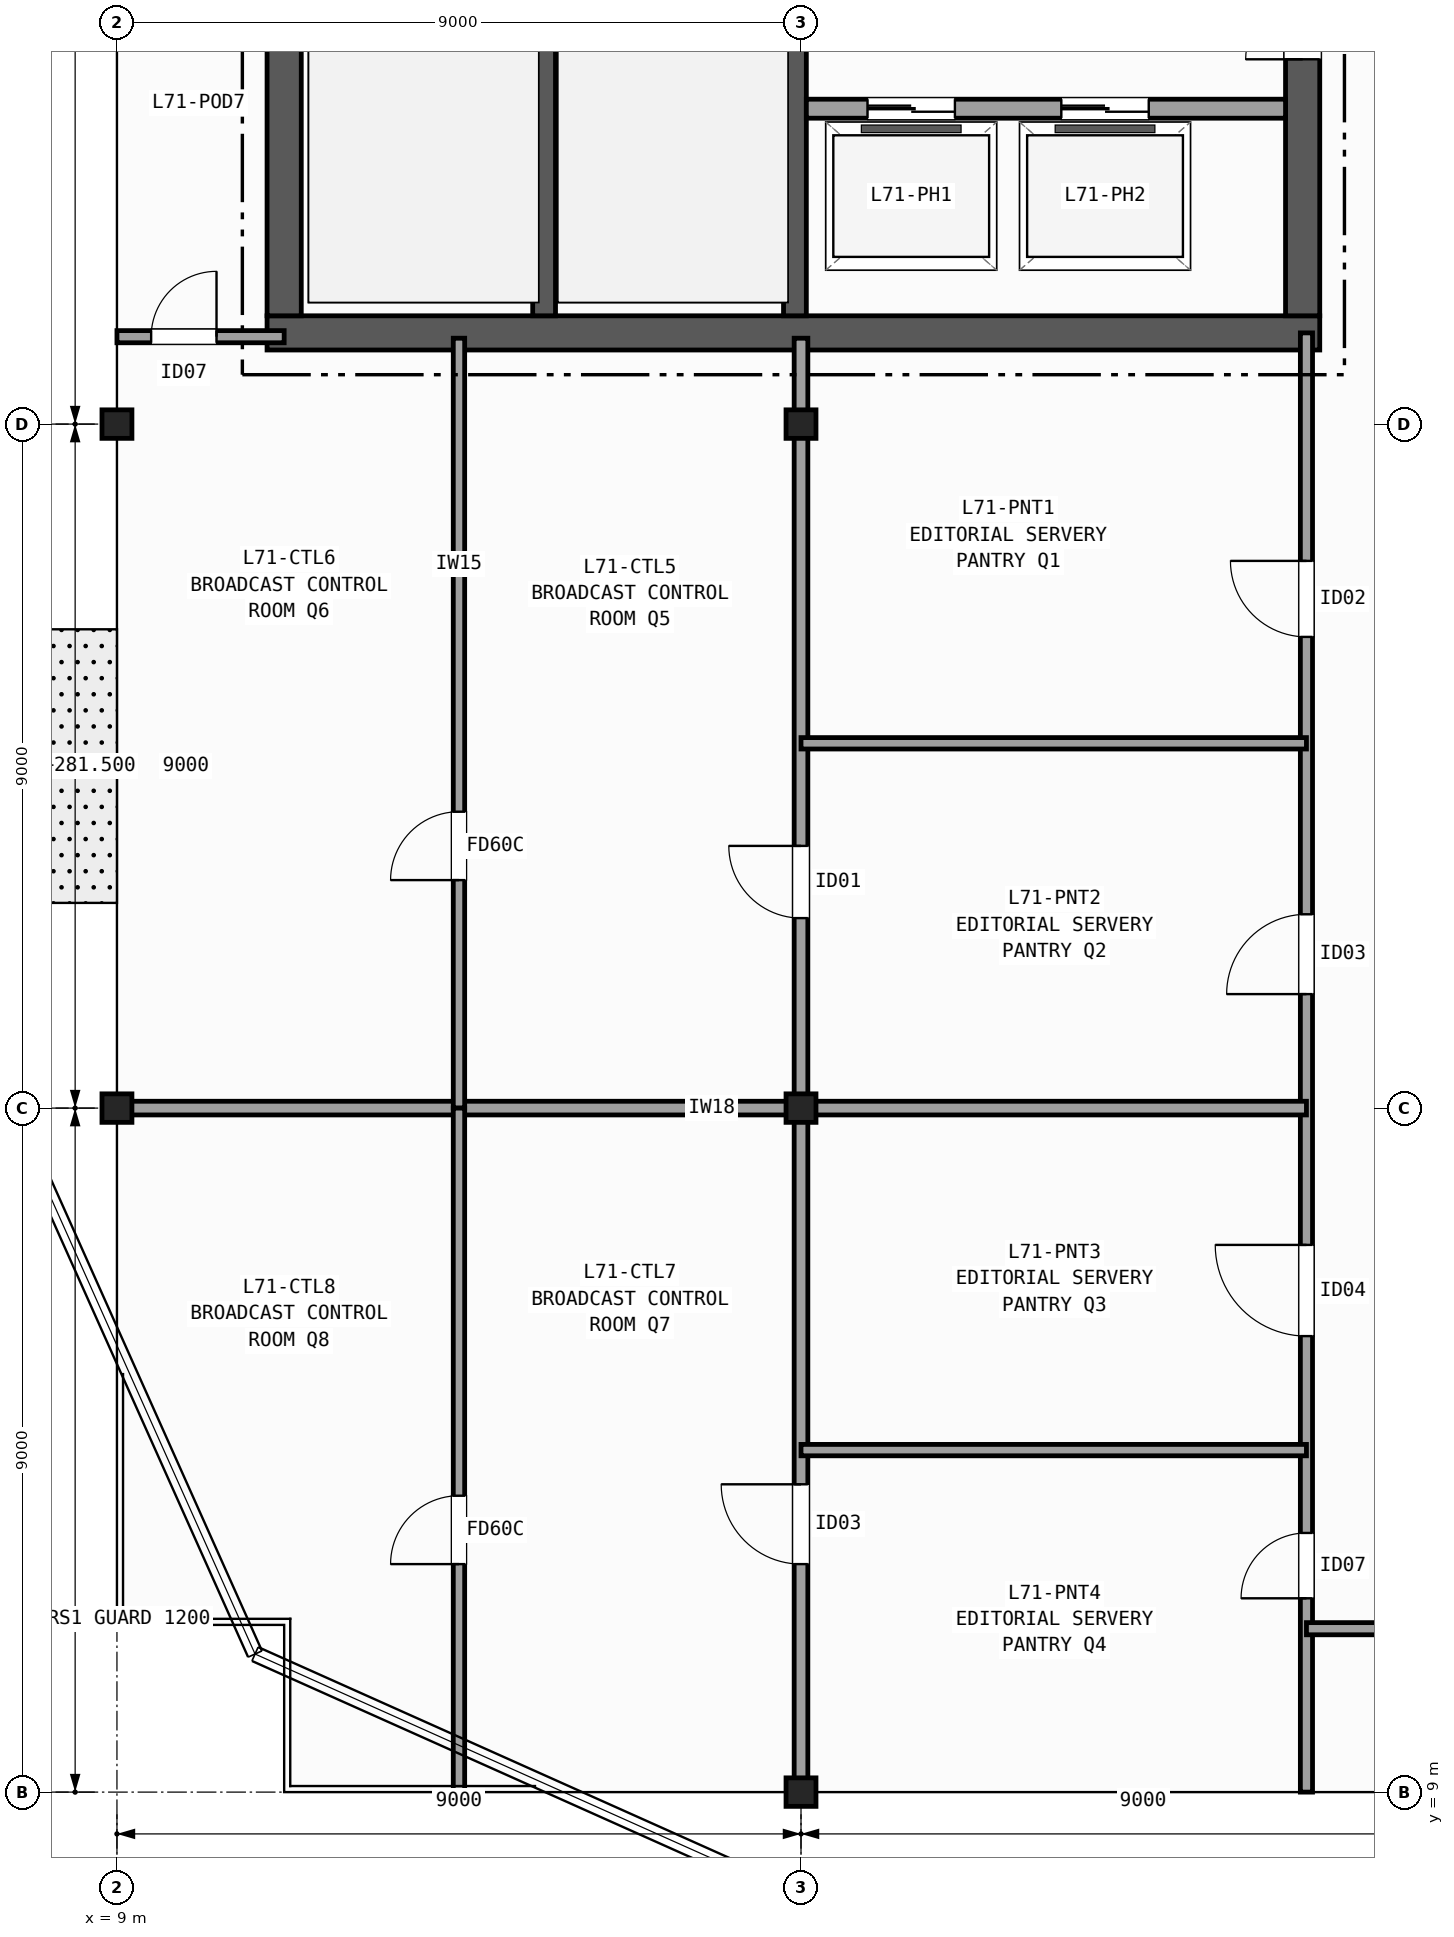
"""IFC4 building model, lengths in metres.
Left out: names, types, materials, properties, quantities, classifications, styles, units other than length and angle.
Written with IfcOpenShell. Run it as: python <this file> out.ifc"""

import sys

from ifc_helpers import new_model, si_unit, direction, frame, frame_2d, origin, origin_2d, place, context, subcontext, project, spatial, rectangle, i_section, extrude, element, fill, save


model = new_model("IFC4")
c1 = context("Model", 3, precision=1e-05, world=origin(), true_north=direction((0.0, 1.0)))
c2 = subcontext(c1, "Body", "Model", "MODEL_VIEW")
j1 = project(units=[si_unit("LENGTHUNIT", "METRE"), si_unit("PLANEANGLEUNIT", "RADIAN")], contexts=[c1])
p1 = place(None, origin())
s1 = spatial("IfcSite", under=j1, at=p1, CompositionType="ELEMENT")
p2 = place(p1, origin())
s2 = spatial("IfcBuilding", under=s1, at=p2, CompositionType="ELEMENT")
p3 = place(p2, frame((0.0, 0.0, 281.5)))
s3 = spatial("IfcBuildingStorey", under=s2, at=p3, CompositionType="ELEMENT", Elevation=281.5)
for number, where, z_axis, x_axis in (
    (1, (9.0, 18.0, 0.0), (0.0, 0.0, 1.0), (1.0, 0.0, 0.0)),
    (2, (9.0, 27.0, 0.0), (0.0, 0.0, 1.0), (1.0, 0.0, 0.0)),
    (3, (18.0, 9.0, 0.0), (0.0, 0.0, 1.0), (1.0, 0.0, 0.0)),
    (4, (18.0, 18.0, 0.0), (0.0, 0.0, 1.0), (1.0, 0.0, 0.0)),
    (5, (18.0, 27.0, 0.0), (0.0, 0.0, 1.0), (1.0, 0.0, 0.0)),
):
    element("IfcColumn", number, at=place(p3, frame(where, z_axis=z_axis, x_axis=x_axis)), inside=s3, PredefinedType="COLUMN", context=c2, shape_type="SweptSolid", body=[
        extrude(i_section(OverallWidth=0.394, OverallDepth=0.375, WebThickness=0.017, FlangeThickness=0.028, FilletRadius=0.015, at=origin_2d()), origin(), (0.0, 0.0, 1.0), 3.7),
    ])
p4 = place(p3, frame((10.975, 28.2, 0.0), z_axis=(0.0, 0.0, 1.0), x_axis=(1.0, 0.0, 0.0)))
e6 = element("IfcWall", 6, at=p4, inside=s3, PredefinedType="SHEAR", context=c2, shape_type="SweptSolid", body=[
    extrude(rectangle(XDim=13.85, YDim=0.45, at=frame_2d((6.925, 0.0))), origin(), (0.0, 0.0, 1.0), 3.37),
])
p5 = place(p3, frame((11.2, 42.175, 0.0), z_axis=(0.0, 0.0, 1.0), x_axis=(0.0, -1.0, 0.0)))
e7 = element("IfcWall", 7, at=p5, inside=s3, PredefinedType="SHEAR", context=c2, shape_type="SweptSolid", body=[
    extrude(rectangle(XDim=13.75, YDim=0.45, at=frame_2d((6.875, 0.0))), origin(), (0.0, 0.0, 1.0), 3.37),
])
p6 = place(p3, frame((24.6, 28.425, 0.0), z_axis=(0.0, 0.0, 1.0), x_axis=(0.0, 1.0, 0.0)))
e8 = element("IfcWall", 8, at=p6, inside=s3, PredefinedType="SHEAR", context=c2, shape_type="SweptSolid", body=[
    extrude(rectangle(XDim=13.75, YDim=0.45, at=frame_2d((6.875, 0.0))), origin(), (0.0, 0.0, 1.0), 3.37),
])
p7 = place(p6, frame((3.375, 0.0, 0.0)))
e9 = element("IfcOpeningElement", 9, at=p7, cuts=e8, PredefinedType="OPENING", context=c2, shape_type="SweptSolid", body=[
    extrude(rectangle(XDim=1.5, YDim=2.2, at=frame_2d((0.75, 1.1))), frame((0.0, 0.235, 0.0), z_axis=(0.0, -1.0, 0.0), x_axis=(1.0, 0.0, 0.0)), (0.0, 0.0, 1.0), 0.47),
])
p8 = place(p6, frame((9.975, 0.0, 0.0)))
e10 = element("IfcOpeningElement", 10, at=p8, cuts=e8, PredefinedType="OPENING", context=c2, shape_type="SweptSolid", body=[
    extrude(rectangle(XDim=0.9, YDim=2.1, at=frame_2d((0.45, 1.05))), frame((0.0, 0.235, 0.0), z_axis=(0.0, -1.0, 0.0), x_axis=(1.0, 0.0, 0.0)), (0.0, 0.0, 1.0), 0.47),
])
p9 = place(p6, frame((12.075, 0.0, 0.0)))
e11 = element("IfcOpeningElement", 11, at=p9, cuts=e8, PredefinedType="OPENING", context=c2, shape_type="SweptSolid", body=[
    extrude(rectangle(XDim=0.9, YDim=2.1, at=frame_2d((0.45, 1.05))), frame((0.0, 0.235, 0.0), z_axis=(0.0, -1.0, 0.0), x_axis=(1.0, 0.0, 0.0)), (0.0, 0.0, 1.0), 0.47),
])
p10 = place(p3, frame((14.62, 28.425, 0.0), z_axis=(0.0, 0.0, 1.0), x_axis=(0.0, 1.0, 0.0)))
e12 = element("IfcWall", 12, at=p10, inside=s3, PredefinedType="SHEAR", context=c2, shape_type="SweptSolid", body=[
    extrude(rectangle(XDim=9.025, YDim=0.3, at=frame_2d((4.512, 0.0))), origin(), (0.0, 0.0, 1.0), 3.37),
])
p11 = place(p3, frame((17.92, 42.175, 0.0), z_axis=(0.0, 0.0, 1.0), x_axis=(0.0, -1.0, 0.0)))
e13 = element("IfcWall", 13, at=p11, inside=s3, PredefinedType="SHEAR", context=c2, shape_type="SweptSolid", body=[
    extrude(rectangle(XDim=13.75, YDim=0.3, at=frame_2d((6.875, 0.0))), origin(), (0.0, 0.0, 1.0), 3.37),
])
p12 = place(p11, frame((2.0, 0.0, 0.0)))
e14 = element("IfcOpeningElement", 14, at=p12, cuts=e13, PredefinedType="OPENING", context=c2, shape_type="SweptSolid", body=[
    extrude(rectangle(XDim=1.15, YDim=2.15, at=frame_2d((0.575, 1.075))), frame((0.0, 0.16, 0.0), z_axis=(0.0, -1.0, 0.0), x_axis=(1.0, 0.0, 0.0)), (0.0, 0.0, 1.0), 0.32),
])
p13 = place(p3, frame((18.07, 31.15, 0.0), z_axis=(0.0, 0.0, 1.0), x_axis=(1.0, 0.0, 0.0)))
e15 = element("IfcWall", 15, at=p13, inside=s3, PredefinedType="PARTITIONING", context=c2, shape_type="SweptSolid", body=[
    extrude(rectangle(XDim=6.305, YDim=0.25, at=frame_2d((3.152, 0.0))), origin(), (0.0, 0.0, 1.0), 3.37),
])
p14 = place(p13, frame((0.805, 0.0, 0.0)))
e16 = element("IfcOpeningElement", 16, at=p14, cuts=e15, PredefinedType="OPENING", context=c2, shape_type="SweptSolid", body=[
    extrude(rectangle(XDim=1.15, YDim=2.15, at=frame_2d((0.575, 1.075))), frame((0.0, 0.135, 0.0), z_axis=(0.0, -1.0, 0.0), x_axis=(1.0, 0.0, 0.0)), (0.0, 0.0, 1.0), 0.27),
])
p15 = place(p13, frame((3.355, 0.0, 0.0)))
e17 = element("IfcOpeningElement", 17, at=p15, cuts=e15, PredefinedType="OPENING", context=c2, shape_type="SweptSolid", body=[
    extrude(rectangle(XDim=1.15, YDim=2.15, at=frame_2d((0.575, 1.075))), frame((0.0, 0.135, 0.0), z_axis=(0.0, -1.0, 0.0), x_axis=(1.0, 0.0, 0.0)), (0.0, 0.0, 1.0), 0.27),
])
p16 = place(p3, frame((9.0, 28.15, 0.0), z_axis=(0.0, 0.0, 1.0), x_axis=(1.0, 0.0, 0.0)))
e18 = element("IfcWall", 18, at=p16, inside=s3, PredefinedType="PARTITIONING", context=c2, shape_type="SweptSolid", body=[
    extrude(rectangle(XDim=2.2, YDim=0.16, at=frame_2d((1.1, 0.0))), origin(), (0.0, 0.0, 1.0), 2.657),
])
p17 = place(p16, frame((0.45, 0.0, 0.0)))
e19 = element("IfcOpeningElement", 19, at=p17, cuts=e18, PredefinedType="OPENING", context=c2, shape_type="SweptSolid", body=[
    extrude(rectangle(XDim=0.86, YDim=2.05, at=frame_2d((0.43, 1.025))), frame((0.0, 0.09, 0.0), z_axis=(0.0, -1.0, 0.0), x_axis=(1.0, 0.0, 0.0)), (0.0, 0.0, 1.0), 0.18),
])
p18 = place(p3, frame((24.65, 9.0, 0.0), z_axis=(0.0, 0.0, 1.0), x_axis=(0.0, 1.0, 0.0)))
e20 = element("IfcWall", 20, at=p18, inside=s3, PredefinedType="PARTITIONING", context=c2, shape_type="SweptSolid", body=[
    extrude(rectangle(XDim=19.2, YDim=0.16, at=frame_2d((9.6, 0.0))), origin(), (0.0, 0.0, 1.0), 2.657),
])
p19 = place(p18, frame((15.2, 0.0, 0.0)))
e21 = element("IfcOpeningElement", 21, at=p19, cuts=e20, PredefinedType="OPENING", context=c2, shape_type="SweptSolid", body=[
    extrude(rectangle(XDim=1.0, YDim=2.1, at=frame_2d((0.5, 1.05))), frame((0.0, 0.09, 0.0), z_axis=(0.0, -1.0, 0.0), x_axis=(1.0, 0.0, 0.0)), (0.0, 0.0, 1.0), 0.18),
])
p20 = place(p18, frame((10.5, 0.0, 0.0)))
e22 = element("IfcOpeningElement", 22, at=p20, cuts=e20, PredefinedType="OPENING", context=c2, shape_type="SweptSolid", body=[
    extrude(rectangle(XDim=1.05, YDim=2.15, at=frame_2d((0.525, 1.075))), frame((0.0, 0.09, 0.0), z_axis=(0.0, -1.0, 0.0), x_axis=(1.0, 0.0, 0.0)), (0.0, 0.0, 1.0), 0.18),
])
p21 = place(p18, frame((6.0, 0.0, 0.0)))
e23 = element("IfcOpeningElement", 23, at=p21, cuts=e20, PredefinedType="OPENING", context=c2, shape_type="SweptSolid", body=[
    extrude(rectangle(XDim=1.2, YDim=2.15, at=frame_2d((0.6, 1.075))), frame((0.0, 0.09, 0.0), z_axis=(0.0, -1.0, 0.0), x_axis=(1.0, 0.0, 0.0)), (0.0, 0.0, 1.0), 0.18),
])
p22 = place(p18, frame((2.55, 0.0, 0.0)))
e24 = element("IfcOpeningElement", 24, at=p22, cuts=e20, PredefinedType="OPENING", context=c2, shape_type="SweptSolid", body=[
    extrude(rectangle(XDim=0.86, YDim=2.05, at=frame_2d((0.43, 1.025))), frame((0.0, 0.09, 0.0), z_axis=(0.0, -1.0, 0.0), x_axis=(1.0, 0.0, 0.0)), (0.0, 0.0, 1.0), 0.18),
])
p23 = place(p3, frame((9.0, 18.0, 0.0), z_axis=(0.0, 0.0, 1.0), x_axis=(1.0, 0.0, 0.0)))
e25 = element("IfcWall", 25, at=p23, inside=s3, PredefinedType="PARTITIONING", context=c2, shape_type="SweptSolid", body=[
    extrude(rectangle(XDim=15.65, YDim=0.18, at=frame_2d((7.825, 0.0))), origin(), (0.0, 0.0, 1.0), 2.657),
])
p24 = place(p3, frame((18.0, 9.0, 0.0), z_axis=(0.0, 0.0, 1.0), x_axis=(0.0, 1.0, 0.0)))
e26 = element("IfcWall", 26, at=p24, inside=s3, PredefinedType="PARTITIONING", context=c2, shape_type="SweptSolid", body=[
    extrude(rectangle(XDim=19.13, YDim=0.18, at=frame_2d((9.565, 0.0))), origin(), (0.0, 0.0, 1.0), 2.657),
])
p25 = place(p24, frame((11.5, 0.0, 0.0)))
e27 = element("IfcOpeningElement", 27, at=p25, cuts=e26, PredefinedType="OPENING", context=c2, shape_type="SweptSolid", body=[
    extrude(rectangle(XDim=0.95, YDim=2.1, at=frame_2d((0.475, 1.05))), frame((0.0, 0.1, 0.0), z_axis=(0.0, -1.0, 0.0), x_axis=(1.0, 0.0, 0.0)), (0.0, 0.0, 1.0), 0.2),
])
p26 = place(p24, frame((3.0, 0.0, 0.0)))
e28 = element("IfcOpeningElement", 28, at=p26, cuts=e26, PredefinedType="OPENING", context=c2, shape_type="SweptSolid", body=[
    extrude(rectangle(XDim=1.05, YDim=2.15, at=frame_2d((0.525, 1.075))), frame((0.0, 0.1, 0.0), z_axis=(0.0, -1.0, 0.0), x_axis=(1.0, 0.0, 0.0)), (0.0, 0.0, 1.0), 0.2),
])
p27 = place(p3, frame((13.5, 18.0, 0.0), z_axis=(0.0, 0.0, 1.0), x_axis=(0.0, 1.0, 0.0)))
e29 = element("IfcWall", 29, at=p27, inside=s3, PredefinedType="PARTITIONING", context=c2, shape_type="SweptSolid", body=[
    extrude(rectangle(XDim=10.13, YDim=0.15, at=frame_2d((5.065, 0.0))), origin(), (0.0, 0.0, 1.0), 2.739),
])
p28 = place(p27, frame((3.0, 0.0, 0.0)))
e30 = element("IfcOpeningElement", 30, at=p28, cuts=e29, PredefinedType="OPENING", context=c2, shape_type="SweptSolid", body=[
    extrude(rectangle(XDim=0.9, YDim=2.1, at=frame_2d((0.45, 1.05))), frame((0.0, 0.085, 0.0), z_axis=(0.0, -1.0, 0.0), x_axis=(1.0, 0.0, 0.0)), (0.0, 0.0, 1.0), 0.17),
])
p29 = place(p3, frame((13.5, 9.0, 0.0), z_axis=(0.0, 0.0, 1.0), x_axis=(0.0, 1.0, 0.0)))
e31 = element("IfcWall", 31, at=p29, inside=s3, PredefinedType="PARTITIONING", context=c2, shape_type="SweptSolid", body=[
    extrude(rectangle(XDim=9.0, YDim=0.15, at=frame_2d((4.5, 0.0))), origin(), (0.0, 0.0, 1.0), 2.739),
])
p30 = place(p29, frame((3.0, 0.0, 0.0)))
e32 = element("IfcOpeningElement", 32, at=p30, cuts=e31, PredefinedType="OPENING", context=c2, shape_type="SweptSolid", body=[
    extrude(rectangle(XDim=0.9, YDim=2.1, at=frame_2d((0.45, 1.05))), frame((0.0, 0.085, 0.0), z_axis=(0.0, -1.0, 0.0), x_axis=(1.0, 0.0, 0.0)), (0.0, 0.0, 1.0), 0.17),
])
for number, where, z_axis, x_axis in (
    (33, (18.0, 22.8, 0.0), (0.0, 0.0, 1.0), (1.0, 0.0, 0.0)),
    (34, (18.0, 13.5, 0.0), (0.0, 0.0, 1.0), (1.0, 0.0, 0.0)),
):
    element("IfcWall", number, at=place(p3, frame(where, z_axis=z_axis, x_axis=x_axis)), inside=s3, PredefinedType="PARTITIONING", context=c2, shape_type="SweptSolid", body=[
        extrude(rectangle(XDim=6.65, YDim=0.15, at=frame_2d((3.325, 0.0))), origin(), (0.0, 0.0, 1.0), 2.742),
    ])
p31 = place(p3, frame((24.65, 11.15, 0.0), z_axis=(0.0, 0.0, 1.0), x_axis=(1.0, 0.0, 0.0)))
e35 = element("IfcWall", 35, at=p31, inside=s3, PredefinedType="PARTITIONING", context=c2, shape_type="SweptSolid", body=[
    extrude(rectangle(XDim=4.75, YDim=0.16, at=frame_2d((2.375, 0.0))), origin(), (0.0, 0.0, 1.0), 2.742),
])
p32 = place(p31, frame((1.2, 0.0, 0.0)))
e36 = element("IfcOpeningElement", 36, at=p32, cuts=e35, PredefinedType="OPENING", context=c2, shape_type="SweptSolid", body=[
    extrude(rectangle(XDim=0.86, YDim=2.05, at=frame_2d((0.43, 1.025))), frame((0.0, 0.09, 0.0), z_axis=(0.0, -1.0, 0.0), x_axis=(1.0, 0.0, 0.0)), (0.0, 0.0, 1.0), 0.18),
])
p33 = place(p7, origin())
e37 = element("IfcDoor", 37, at=p33, inside=s3, OperationType="DOUBLE_DOOR_SINGLE_SWING", PredefinedType="DOOR", context=c2, shape_type="SweptSolid", body=[
    extrude(rectangle(XDim=1.5, YDim=2.2, at=frame_2d((0.75, 1.1))), frame((0.0, 0.025, 0.0), z_axis=(0.0, -1.0, 0.0), x_axis=(1.0, 0.0, 0.0)), (0.0, 0.0, 1.0), 0.05),
])
fill(e9, e37)
p34 = place(p14, origin())
e38 = element("IfcDoor", 38, at=p34, inside=s3, OperationType="DOUBLE_DOOR_SLIDING", PredefinedType="DOOR", context=c2, shape_type="SweptSolid", body=[
    extrude(rectangle(XDim=1.15, YDim=2.15, at=frame_2d((0.575, 1.075))), frame((0.0, 0.025, 0.0), z_axis=(0.0, -1.0, 0.0), x_axis=(1.0, 0.0, 0.0)), (0.0, 0.0, 1.0), 0.05),
])
fill(e16, e38)
p35 = place(p15, origin())
e39 = element("IfcDoor", 39, at=p35, inside=s3, OperationType="DOUBLE_DOOR_SLIDING", PredefinedType="DOOR", context=c2, shape_type="SweptSolid", body=[
    extrude(rectangle(XDim=1.15, YDim=2.15, at=frame_2d((0.575, 1.075))), frame((0.0, 0.025, 0.0), z_axis=(0.0, -1.0, 0.0), x_axis=(1.0, 0.0, 0.0)), (0.0, 0.0, 1.0), 0.05),
])
fill(e17, e39)
p36 = place(p17, origin())
e40 = element("IfcDoor", 40, at=p36, inside=s3, OperationType="SINGLE_SWING_RIGHT", PredefinedType="DOOR", context=c2, shape_type="SweptSolid", body=[
    extrude(rectangle(XDim=0.86, YDim=2.05, at=frame_2d((0.43, 1.025))), frame((0.0, 0.025, 0.0), z_axis=(0.0, -1.0, 0.0), x_axis=(1.0, 0.0, 0.0)), (0.0, 0.0, 1.0), 0.05),
])
fill(e19, e40)
p37 = place(p19, origin())
e41 = element("IfcDoor", 41, at=p37, inside=s3, OperationType="SINGLE_SWING_RIGHT", PredefinedType="DOOR", context=c2, shape_type="SweptSolid", body=[
    extrude(rectangle(XDim=1.0, YDim=2.1, at=frame_2d((0.5, 1.05))), frame((0.0, 0.025, 0.0), z_axis=(0.0, -1.0, 0.0), x_axis=(1.0, 0.0, 0.0)), (0.0, 0.0, 1.0), 0.05),
])
fill(e21, e41)
p38 = place(p20, origin())
e42 = element("IfcDoor", 42, at=p38, inside=s3, OperationType="SINGLE_SWING_LEFT", PredefinedType="DOOR", context=c2, shape_type="SweptSolid", body=[
    extrude(rectangle(XDim=1.05, YDim=2.15, at=frame_2d((0.525, 1.075))), frame((0.0, 0.025, 0.0), z_axis=(0.0, -1.0, 0.0), x_axis=(1.0, 0.0, 0.0)), (0.0, 0.0, 1.0), 0.05),
])
fill(e22, e42)
p39 = place(p21, origin())
e43 = element("IfcDoor", 43, at=p39, inside=s3, OperationType="SINGLE_SWING_RIGHT", PredefinedType="DOOR", context=c2, shape_type="SweptSolid", body=[
    extrude(rectangle(XDim=1.2, YDim=2.15, at=frame_2d((0.6, 1.075))), frame((0.0, 0.025, 0.0), z_axis=(0.0, -1.0, 0.0), x_axis=(1.0, 0.0, 0.0)), (0.0, 0.0, 1.0), 0.05),
])
fill(e23, e43)
p40 = place(p22, origin())
e44 = element("IfcDoor", 44, at=p40, inside=s3, OperationType="SINGLE_SWING_LEFT", PredefinedType="DOOR", context=c2, shape_type="SweptSolid", body=[
    extrude(rectangle(XDim=0.86, YDim=2.05, at=frame_2d((0.43, 1.025))), frame((0.0, 0.025, 0.0), z_axis=(0.0, -1.0, 0.0), x_axis=(1.0, 0.0, 0.0)), (0.0, 0.0, 1.0), 0.05),
])
fill(e24, e44)
p41 = place(p25, origin())
e45 = element("IfcDoor", 45, at=p41, inside=s3, OperationType="SINGLE_SWING_RIGHT", PredefinedType="DOOR", context=c2, shape_type="SweptSolid", body=[
    extrude(rectangle(XDim=0.95, YDim=2.1, at=frame_2d((0.475, 1.05))), frame((0.0, 0.025, 0.0), z_axis=(0.0, -1.0, 0.0), x_axis=(1.0, 0.0, 0.0)), (0.0, 0.0, 1.0), 0.05),
])
fill(e27, e45)
p42 = place(p28, origin())
e46 = element("IfcDoor", 46, at=p42, inside=s3, OperationType="SINGLE_SWING_LEFT", PredefinedType="DOOR", context=c2, shape_type="SweptSolid", body=[
    extrude(rectangle(XDim=0.9, YDim=2.1, at=frame_2d((0.45, 1.05))), frame((0.0, 0.025, 0.0), z_axis=(0.0, -1.0, 0.0), x_axis=(1.0, 0.0, 0.0)), (0.0, 0.0, 1.0), 0.05),
])
fill(e30, e46)
p43 = place(p26, origin())
e47 = element("IfcDoor", 47, at=p43, inside=s3, OperationType="SINGLE_SWING_RIGHT", PredefinedType="DOOR", context=c2, shape_type="SweptSolid", body=[
    extrude(rectangle(XDim=1.05, YDim=2.15, at=frame_2d((0.525, 1.075))), frame((0.0, 0.025, 0.0), z_axis=(0.0, -1.0, 0.0), x_axis=(1.0, 0.0, 0.0)), (0.0, 0.0, 1.0), 0.05),
])
fill(e28, e47)
p44 = place(p30, origin())
e48 = element("IfcDoor", 48, at=p44, inside=s3, OperationType="SINGLE_SWING_LEFT", PredefinedType="DOOR", context=c2, shape_type="SweptSolid", body=[
    extrude(rectangle(XDim=0.9, YDim=2.1, at=frame_2d((0.45, 1.05))), frame((0.0, 0.025, 0.0), z_axis=(0.0, -1.0, 0.0), x_axis=(1.0, 0.0, 0.0)), (0.0, 0.0, 1.0), 0.05),
])
fill(e32, e48)
save(model, sys.argv[1])
